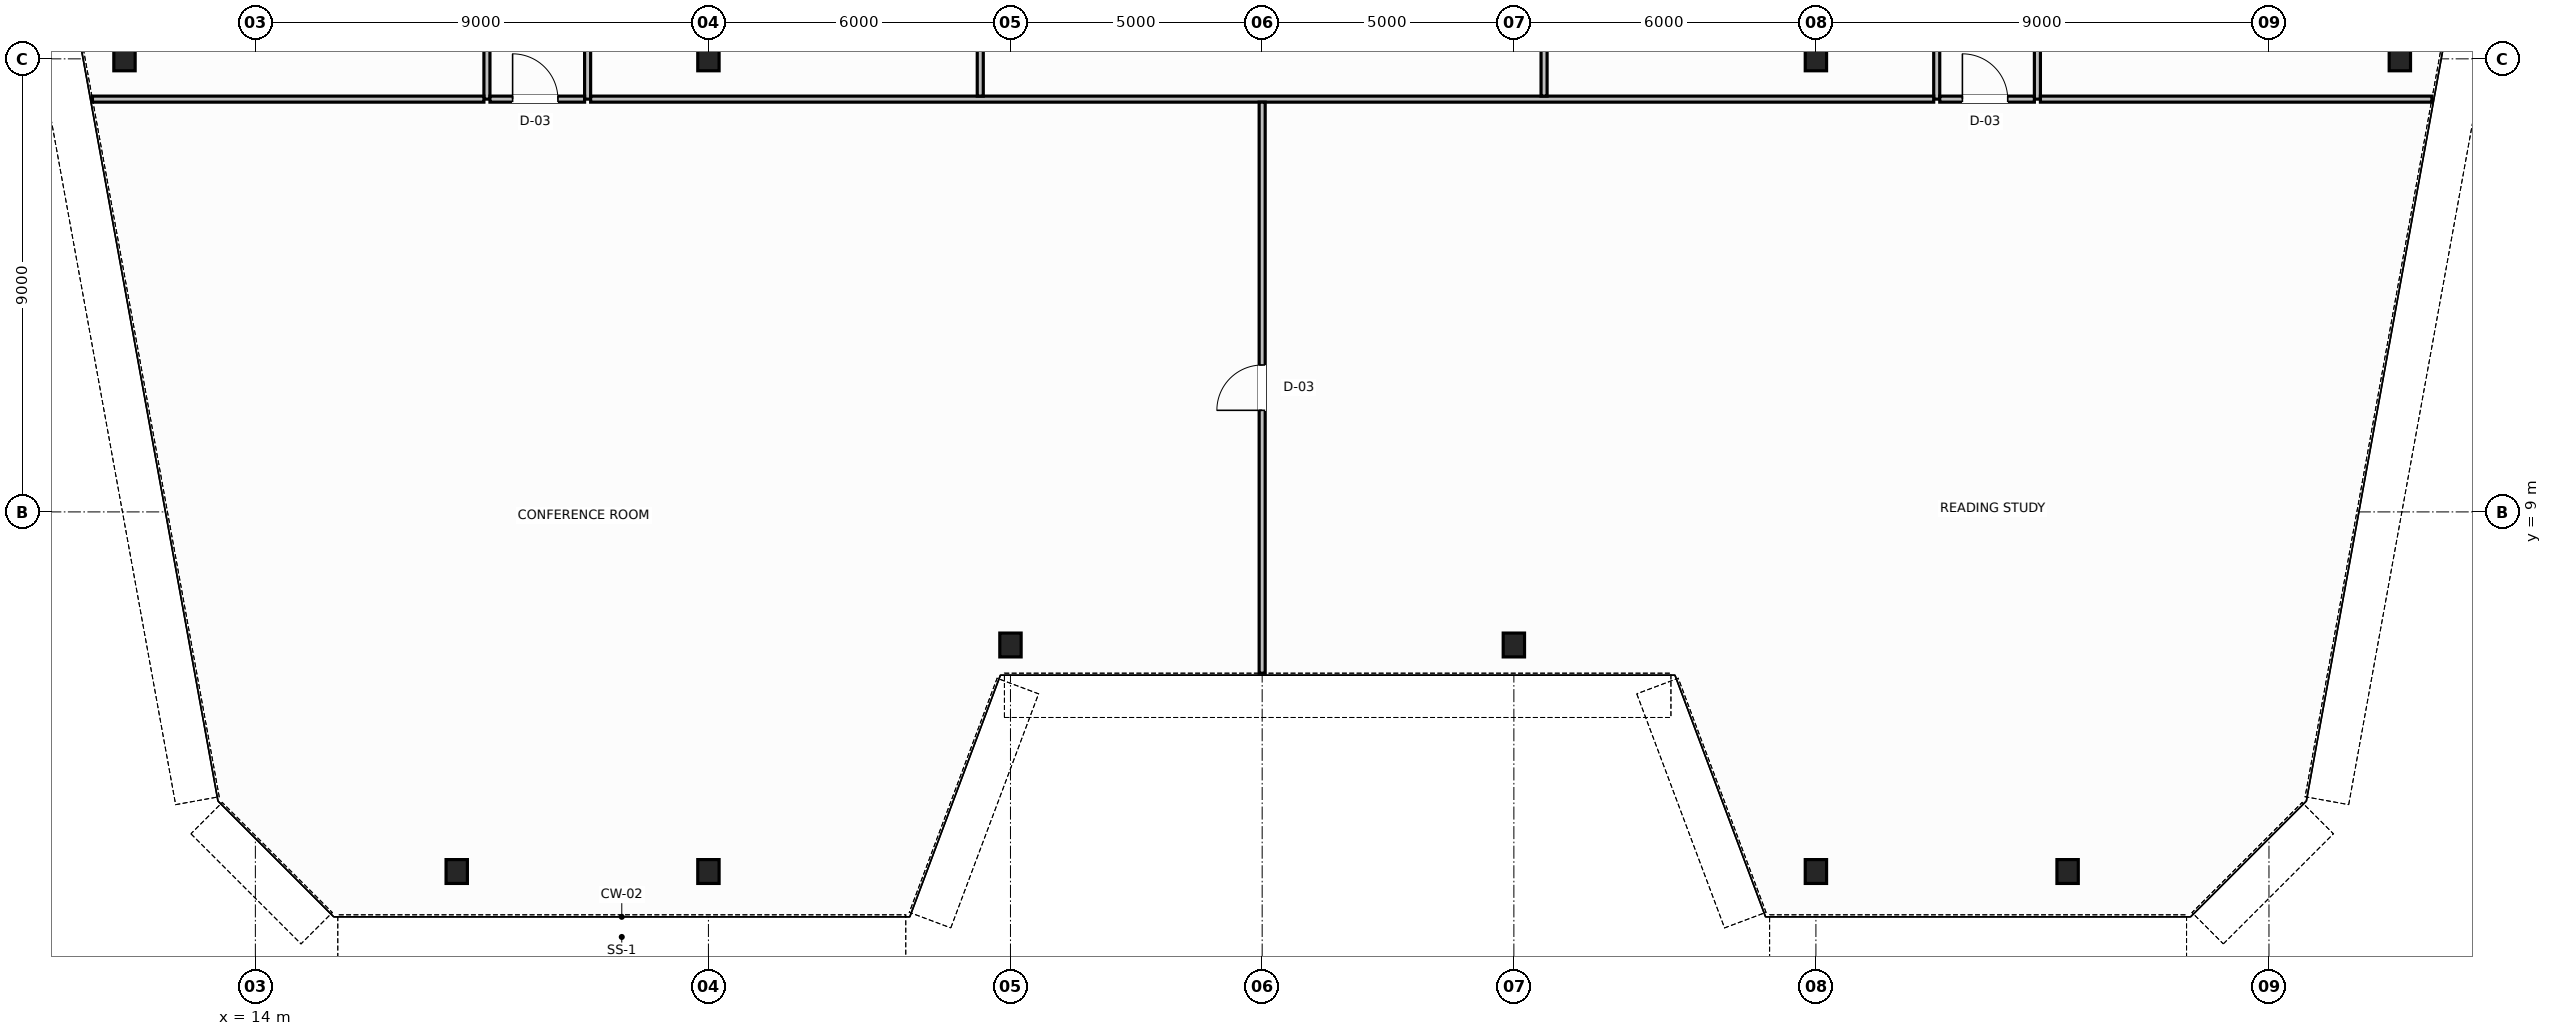
"""IFC4 building model, lengths in metres.
Left out: names, types, materials, properties, quantities, classifications, styles, units other than length and angle.
Written with IfcOpenShell. Run it as: python <this file> out.ifc"""

import sys

from ifc_helpers import new_model, si_unit, direction, frame, frame_2d, origin, origin_2d, place, context, subcontext, project, spatial, rectangle, i_section, extrude, source, transform, mapped, element, fill, save


model = new_model("IFC4")
c1 = context("Model", 3, precision=1e-05, world=origin(), true_north=direction((0.0, 1.0)))
c2 = subcontext(c1, "Body", "Model", "MODEL_VIEW")
j1 = project(units=[si_unit("LENGTHUNIT", "METRE"), si_unit("PLANEANGLEUNIT", "RADIAN")], contexts=[c1])
p1 = place(None, origin())
s1 = spatial("IfcSite", under=j1, at=p1, CompositionType="ELEMENT")
p2 = place(p1, origin())
s2 = spatial("IfcBuilding", under=s1, at=p2, CompositionType="ELEMENT")
p3 = place(p2, frame((0.0, 0.0, 130.0)))
s3 = spatial("IfcBuildingStorey", under=s2, at=p3, CompositionType="ELEMENT", Elevation=130.0)
m1 = source(origin(), c2, "Body", "SweptSolid", [
    extrude(i_section(OverallWidth=0.424, OverallDepth=0.474, WebThickness=0.047, FlangeThickness=0.065, FilletRadius=0.015, at=origin_2d()), origin(), (0.0, 0.0, 1.0), 3.8),
])
for number, where, z_axis, x_axis in (
    (1, (11.4, 18.0, 0.0), (0.0, 0.0, 1.0), (1.0, 0.0, 0.0)),
    (2, (56.6, 18.0, 0.0), (0.0, 0.0, 1.0), (1.0, 0.0, 0.0)),
):
    element("IfcColumn", number, at=place(p3, frame(where, z_axis=z_axis, x_axis=x_axis)), inside=s3, PredefinedType="COLUMN", context=c2, shape_type="MappedRepresentation", body=[
        mapped(m1, transform((0.0, 0.0, 0.0), scale=1.0)),
    ])
m2 = source(origin(), c2, "Body", "SweptSolid", [
    extrude(i_section(OverallWidth=0.424, OverallDepth=0.474, WebThickness=0.047, FlangeThickness=0.065, FilletRadius=0.015, at=origin_2d()), origin(), (0.0, 0.0, 1.0), 3.8),
])
for number, where, z_axis, x_axis in (
    (3, (23.0, 18.0, 0.0), (0.0, 0.0, 1.0), (1.0, 0.0, 0.0)),
    (4, (45.0, 18.0, 0.0), (0.0, 0.0, 1.0), (1.0, 0.0, 0.0)),
):
    element("IfcColumn", number, at=place(p3, frame(where, z_axis=z_axis, x_axis=x_axis)), inside=s3, PredefinedType="COLUMN", context=c2, shape_type="MappedRepresentation", body=[
        mapped(m2, transform((0.0, 0.0, 0.0), scale=1.0)),
    ])
m3 = source(origin(), c2, "Body", "SweptSolid", [
    extrude(i_section(OverallWidth=0.424, OverallDepth=0.474, WebThickness=0.047, FlangeThickness=0.065, FilletRadius=0.015, at=origin_2d()), origin(), (0.0, 0.0, 1.0), 3.744),
])
for number, where, z_axis, x_axis in (
    (5, (18.0, 1.856, 0.032), (0.0, -0.064, 0.998), (1.0, 0.0, 0.0)),
    (6, (23.0, 1.856, 0.032), (0.0, -0.064, 0.998), (1.0, 0.0, 0.0)),
    (7, (29.0, 6.356, 0.032), (0.0, -0.064, 0.998), (1.0, 0.0, 0.0)),
    (8, (39.0, 6.356, 0.032), (0.0, -0.064, 0.998), (1.0, 0.0, 0.0)),
    (9, (45.0, 1.856, 0.032), (0.0, -0.064, 0.998), (1.0, 0.0, 0.0)),
    (10, (50.0, 1.856, 0.032), (0.0, -0.064, 0.998), (1.0, 0.0, 0.0)),
):
    element("IfcColumn", number, at=place(p3, frame(where, z_axis=z_axis, x_axis=x_axis)), inside=s3, PredefinedType="COLUMN", context=c2, shape_type="MappedRepresentation", body=[
        mapped(m3, transform((0.0, 0.0, 0.0), scale=1.0)),
    ])
p4 = place(p3, frame((18.6, 17.2, 0.0), z_axis=(0.0, 0.0, 1.0), x_axis=(0.0, 1.0, 0.0)))
e11 = element("IfcWall", 11, at=p4, inside=s3, PredefinedType="PARTITIONING", context=c2, shape_type="SweptSolid", body=[
    extrude(rectangle(XDim=16.84, YDim=0.12, at=frame_2d((8.42, 0.0))), origin(), (0.0, 0.0, 1.0), 3.58),
])
p5 = place(p4, frame((3.35, 0.0, 0.0)))
e12 = element("IfcOpeningElement", 12, at=p5, cuts=e11, PredefinedType="OPENING", context=c2, shape_type="SweptSolid", body=[
    extrude(rectangle(XDim=0.9, YDim=2.15, at=frame_2d((0.45, 1.075))), frame((0.0, 0.07, 0.0), z_axis=(0.0, -1.0, 0.0), x_axis=(1.0, 0.0, 0.0)), (0.0, 0.0, 1.0), 0.14),
])
p6 = place(p4, frame((11.77, 0.0, 0.0)))
e13 = element("IfcOpeningElement", 13, at=p6, cuts=e11, PredefinedType="OPENING", context=c2, shape_type="SweptSolid", body=[
    extrude(rectangle(XDim=0.9, YDim=2.15, at=frame_2d((0.45, 1.075))), frame((0.0, 0.07, 0.0), z_axis=(0.0, -1.0, 0.0), x_axis=(1.0, 0.0, 0.0)), (0.0, 0.0, 1.0), 0.14),
])
for number, where, z_axis, x_axis in (
    (14, (20.6, 17.2, 0.0), (0.0, 0.0, 1.0), (0.0, 1.0, 0.0)),
    (15, (47.4, 17.2, 0.0), (0.0, 0.0, 1.0), (0.0, 1.0, 0.0)),
):
    element("IfcWall", number, at=place(p3, frame(where, z_axis=z_axis, x_axis=x_axis)), inside=s3, PredefinedType="PARTITIONING", context=c2, shape_type="SweptSolid", body=[
        extrude(rectangle(XDim=16.84, YDim=0.12, at=frame_2d((8.42, 0.0))), origin(), (0.0, 0.0, 1.0), 3.58),
    ])
p7 = place(p3, frame((49.4, 17.2, 0.0), z_axis=(0.0, 0.0, 1.0), x_axis=(0.0, 1.0, 0.0)))
e16 = element("IfcWall", 16, at=p7, inside=s3, PredefinedType="PARTITIONING", context=c2, shape_type="SweptSolid", body=[
    extrude(rectangle(XDim=16.84, YDim=0.12, at=frame_2d((8.42, 0.0))), origin(), (0.0, 0.0, 1.0), 3.58),
])
p8 = place(p7, frame((2.75, 0.0, 0.0)))
e17 = element("IfcOpeningElement", 17, at=p8, cuts=e16, PredefinedType="OPENING", context=c2, shape_type="SweptSolid", body=[
    extrude(rectangle(XDim=0.9, YDim=2.15, at=frame_2d((0.45, 1.075))), frame((0.0, 0.07, 0.0), z_axis=(0.0, -1.0, 0.0), x_axis=(1.0, 0.0, 0.0)), (0.0, 0.0, 1.0), 0.14),
])
p9 = place(p7, frame((9.05, 0.0, 0.0)))
e18 = element("IfcOpeningElement", 18, at=p9, cuts=e16, PredefinedType="OPENING", context=c2, shape_type="SweptSolid", body=[
    extrude(rectangle(XDim=0.9, YDim=2.15, at=frame_2d((0.45, 1.075))), frame((0.0, 0.07, 0.0), z_axis=(0.0, -1.0, 0.0), x_axis=(1.0, 0.0, 0.0)), (0.0, 0.0, 1.0), 0.14),
])
p10 = place(p7, frame((14.27, 0.0, 0.0)))
e19 = element("IfcOpeningElement", 19, at=p10, cuts=e16, PredefinedType="OPENING", context=c2, shape_type="SweptSolid", body=[
    extrude(rectangle(XDim=0.9, YDim=2.15, at=frame_2d((0.45, 1.075))), frame((0.0, 0.07, 0.0), z_axis=(0.0, -1.0, 0.0), x_axis=(1.0, 0.0, 0.0)), (0.0, 0.0, 1.0), 0.14),
])
p11 = place(p3, frame((18.66, 17.2, 0.0), z_axis=(0.0, 0.0, 1.0), x_axis=(1.0, 0.0, 0.0)))
e20 = element("IfcWall", 20, at=p11, inside=s3, PredefinedType="PARTITIONING", context=c2, shape_type="SweptSolid", body=[
    extrude(rectangle(XDim=1.88, YDim=0.12, at=frame_2d((0.94, 0.0))), origin(), (0.0, 0.0, 1.0), 3.58),
])
p12 = place(p11, frame((0.45, 0.0, 0.0)))
e21 = element("IfcOpeningElement", 21, at=p12, cuts=e20, PredefinedType="OPENING", context=c2, shape_type="SweptSolid", body=[
    extrude(rectangle(XDim=0.9, YDim=2.15, at=frame_2d((0.45, 1.075))), frame((0.0, 0.07, 0.0), z_axis=(0.0, -1.0, 0.0), x_axis=(1.0, 0.0, 0.0)), (0.0, 0.0, 1.0), 0.14),
])
p13 = place(p3, frame((47.46, 17.2, 0.0), z_axis=(0.0, 0.0, 1.0), x_axis=(1.0, 0.0, 0.0)))
e22 = element("IfcWall", 22, at=p13, inside=s3, PredefinedType="PARTITIONING", context=c2, shape_type="SweptSolid", body=[
    extrude(rectangle(XDim=1.88, YDim=0.12, at=frame_2d((0.94, 0.0))), origin(), (0.0, 0.0, 1.0), 3.58),
])
p14 = place(p13, frame((0.45, 0.0, 0.0)))
e23 = element("IfcOpeningElement", 23, at=p14, cuts=e22, PredefinedType="OPENING", context=c2, shape_type="SweptSolid", body=[
    extrude(rectangle(XDim=0.9, YDim=2.15, at=frame_2d((0.45, 1.075))), frame((0.0, 0.07, 0.0), z_axis=(0.0, -1.0, 0.0), x_axis=(1.0, 0.0, 0.0)), (0.0, 0.0, 1.0), 0.14),
])
for number, where, z_axis, x_axis in (
    (24, (10.764, 17.2, 0.0), (0.0, 0.0, 1.0), (1.0, 0.0, 0.0)),
    (25, (49.46, 17.2, 0.0), (0.0, 0.0, 1.0), (1.0, 0.0, 0.0)),
):
    element("IfcWall", number, at=place(p3, frame(where, z_axis=z_axis, x_axis=x_axis)), inside=s3, PredefinedType="PARTITIONING", context=c2, shape_type="SweptSolid", body=[
        extrude(rectangle(XDim=7.776, YDim=0.12, at=frame_2d((3.888, 0.0))), origin(), (0.0, 0.0, 1.0), 3.58),
    ])
p15 = place(p3, frame((20.66, 17.2, 0.0), z_axis=(0.0, 0.0, 1.0), x_axis=(1.0, 0.0, 0.0)))
e26 = element("IfcWall", 26, at=p15, inside=s3, PredefinedType="PARTITIONING", context=c2, shape_type="SweptSolid", body=[
    extrude(rectangle(XDim=26.68, YDim=0.12, at=frame_2d((13.34, 0.0))), origin(), (0.0, 0.0, 1.0), 3.58),
])
for number, where, z_axis, x_axis in (
    (27, (28.4, 17.26, 0.0), (0.0, 0.0, 1.0), (0.0, 1.0, 0.0)),
    (28, (39.6, 17.26, 0.0), (0.0, 0.0, 1.0), (0.0, 1.0, 0.0)),
):
    element("IfcWall", number, at=place(p3, frame(where, z_axis=z_axis, x_axis=x_axis)), inside=s3, PredefinedType="PARTITIONING", context=c2, shape_type="SweptSolid", body=[
        extrude(rectangle(XDim=16.78, YDim=0.12, at=frame_2d((8.39, 0.0))), origin(), (0.0, 0.0, 1.0), 3.58),
    ])
p16 = place(p3, frame((34.0, 5.796, 0.0), z_axis=(0.0, 0.0, 1.0), x_axis=(0.0, 1.0, 0.0)))
e29 = element("IfcWall", 29, at=p16, inside=s3, PredefinedType="PARTITIONING", context=c2, shape_type="SweptSolid", body=[
    extrude(rectangle(XDim=11.344, YDim=0.12, at=frame_2d((5.672, 0.0))), origin(), (0.0, 0.0, 1.0), 3.58),
])
p17 = place(p16, frame((5.222, 0.0, 0.0)))
e30 = element("IfcOpeningElement", 30, at=p17, cuts=e29, PredefinedType="OPENING", context=c2, shape_type="SweptSolid", body=[
    extrude(rectangle(XDim=0.9, YDim=2.15, at=frame_2d((0.45, 1.075))), frame((0.0, 0.07, 0.0), z_axis=(0.0, -1.0, 0.0), x_axis=(1.0, 0.0, 0.0)), (0.0, 0.0, 1.0), 0.14),
])
m4 = source(origin(), c2, "Body", "SweptSolid", [
    extrude(rectangle(XDim=0.9, YDim=2.15, at=frame_2d((0.45, 1.075))), frame((0.0, 0.025, 0.0), z_axis=(0.0, -1.0, 0.0), x_axis=(1.0, 0.0, 0.0)), (0.0, 0.0, 1.0), 0.05),
])
p18 = place(p12, origin())
e31 = element("IfcDoor", 31, at=p18, inside=s3, OperationType="SINGLE_SWING_LEFT", PredefinedType="DOOR", context=c2, shape_type="MappedRepresentation", body=[
    mapped(m4, transform((0.0, 0.0, 0.0), scale=1.0)),
])
fill(e21, e31)
p19 = place(p17, origin())
e32 = element("IfcDoor", 32, at=p19, inside=s3, OperationType="SINGLE_SWING_RIGHT", PredefinedType="DOOR", context=c2, shape_type="MappedRepresentation", body=[
    mapped(m4, transform((0.0, 0.0, 0.0), scale=1.0)),
])
fill(e30, e32)
p20 = place(p14, origin())
e33 = element("IfcDoor", 33, at=p20, inside=s3, OperationType="SINGLE_SWING_RIGHT", PredefinedType="DOOR", context=c2, shape_type="MappedRepresentation", body=[
    mapped(m4, transform((0.0, 0.0, 0.0), scale=1.0)),
])
fill(e23, e33)
save(model, sys.argv[1])
